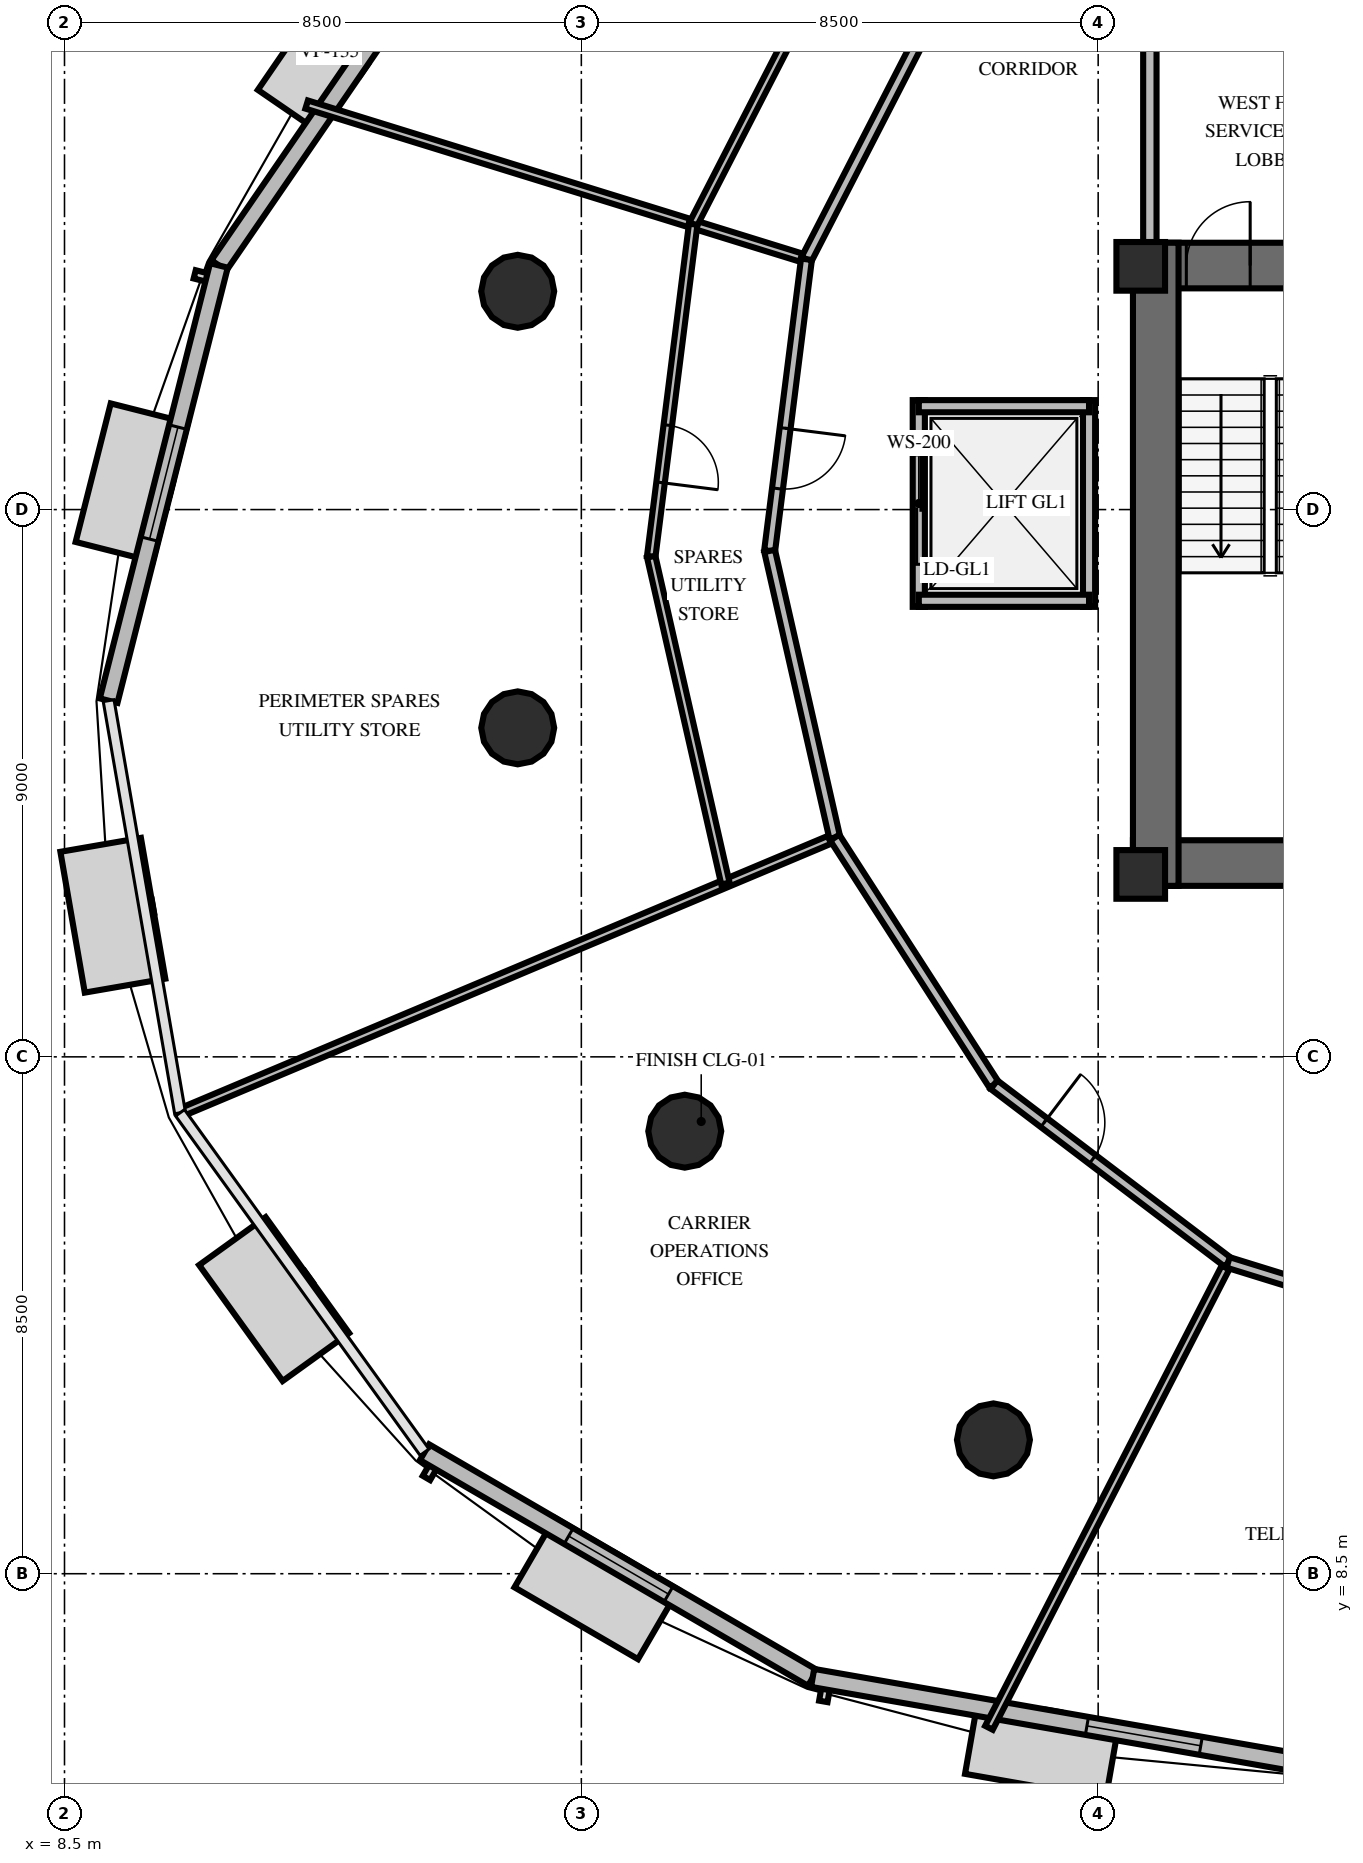
"""IFC4 building model, lengths in metres.
Left out: names, types, materials, properties, quantities, classifications, styles, units other than length and angle.
Written with IfcOpenShell. Run it as: python <this file> out.ifc"""

import sys

from ifc_helpers import new_model, si_unit, direction, frame, frame_2d, origin, origin_2d, place, context, subcontext, project, spatial, rectangle, circle, extrude, element, fill, save


model = new_model("IFC4")
c1 = context("Model", 3, precision=1e-05, world=origin(), true_north=direction((0.0, 1.0)))
c2 = subcontext(c1, "Body", "Model", "MODEL_VIEW")
j1 = project(units=[si_unit("LENGTHUNIT", "METRE"), si_unit("PLANEANGLEUNIT", "RADIAN")], contexts=[c1])
p1 = place(None, origin())
s1 = spatial("IfcSite", under=j1, at=p1, CompositionType="ELEMENT")
p2 = place(p1, origin())
s2 = spatial("IfcBuilding", under=s1, at=p2, CompositionType="ELEMENT")
p3 = place(p2, frame((0.0, 0.0, 129.8)))
s3 = spatial("IfcBuildingStorey", under=s2, at=p3, CompositionType="ELEMENT", Elevation=129.8)
p4 = place(p3, frame((26.072, 20.187, 0.0), z_axis=(0.0, 0.0, 1.0), x_axis=(1.0, 0.0, 0.0)))
e1 = element("IfcWall", 1, at=p4, inside=s3, PredefinedType="SHEAR", context=c2, shape_type="SweptSolid", body=[
    extrude(rectangle(XDim=15.866, YDim=0.75, at=frame_2d((7.933, 0.0))), origin(), (0.0, 0.0, 1.0), 4.0),
])
p5 = place(p3, frame((26.072, 30.013, 0.0), z_axis=(0.0, 0.0, 1.0), x_axis=(1.0, 0.0, 0.0)))
e2 = element("IfcWall", 2, at=p5, inside=s3, PredefinedType="SHEAR", context=c2, shape_type="SweptSolid", body=[
    extrude(rectangle(XDim=15.866, YDim=0.75, at=frame_2d((7.933, 0.0))), origin(), (0.0, 0.0, 1.0), 4.0),
])
p6 = place(p5, frame((0.878, 0.0, 0.0)))
e3 = element("IfcOpeningElement", 3, at=p6, cuts=e2, PredefinedType="OPENING", context=c2, shape_type="SweptSolid", body=[
    extrude(rectangle(XDim=1.05, YDim=2.15, at=frame_2d((0.525, 1.075))), frame((0.0, 0.385, 0.0), z_axis=(0.0, -1.0, 0.0), x_axis=(1.0, 0.0, 0.0)), (0.0, 0.0, 1.0), 0.77),
])
p7 = place(p5, frame((13.928, 0.0, 0.0)))
e4 = element("IfcOpeningElement", 4, at=p7, cuts=e2, PredefinedType="OPENING", context=c2, shape_type="SweptSolid", body=[
    extrude(rectangle(XDim=1.05, YDim=2.15, at=frame_2d((0.525, 1.075))), frame((0.0, 0.385, 0.0), z_axis=(0.0, -1.0, 0.0), x_axis=(1.0, 0.0, 0.0)), (0.0, 0.0, 1.0), 0.77),
])
p8 = place(p5, frame((7.378, 0.0, 0.0)))
e5 = element("IfcOpeningElement", 5, at=p8, cuts=e2, PredefinedType="OPENING", context=c2, shape_type="SweptSolid", body=[
    extrude(rectangle(XDim=1.1, YDim=2.15, at=frame_2d((0.55, 1.075))), frame((0.0, 0.385, 0.0), z_axis=(0.0, -1.0, 0.0), x_axis=(1.0, 0.0, 0.0)), (0.0, 0.0, 1.0), 0.77),
])
p9 = place(p3, frame((26.447, 19.812, 0.0), z_axis=(0.0, 0.0, 1.0), x_axis=(0.0, 1.0, 0.0)))
e6 = element("IfcWall", 6, at=p9, inside=s3, PredefinedType="SHEAR", context=c2, shape_type="SweptSolid", body=[
    extrude(rectangle(XDim=10.576, YDim=0.75, at=frame_2d((5.288, 0.0))), origin(), (0.0, 0.0, 1.0), 4.0),
])
for number, where, z_axis, x_axis in (
    (7, (26.2, 20.0, 0.0), (0.0, 0.0, 1.0), (1.0, 0.0, 0.0)),
    (8, (26.2, 30.0, 0.0), (0.0, 0.0, 1.0), (1.0, 0.0, 0.0)),
):
    element("IfcColumn", number, at=place(p3, frame(where, z_axis=z_axis, x_axis=x_axis)), inside=s3, PredefinedType="PILASTER", context=c2, shape_type="SweptSolid", body=[
        extrude(rectangle(XDim=0.8, YDim=0.8, at=origin_2d()), origin(), (0.0, 0.0, 1.0), 4.0),
    ])
for number, where, z_axis, x_axis in (
    (9, (15.954, 29.59, 0.0), (0.0, 0.0, 1.0), (1.0, 0.0, 0.0)),
    (10, (15.954, 22.41, 0.0), (0.0, 0.0, 1.0), (1.0, 0.0, 0.0)),
    (11, (18.701, 15.778, 0.0), (0.0, 0.0, 1.0), (1.0, 0.0, 0.0)),
    (12, (23.778, 10.701, 0.0), (0.0, 0.0, 1.0), (1.0, 0.0, 0.0)),
):
    element("IfcColumn", number, at=place(p3, frame(where, z_axis=z_axis, x_axis=x_axis)), inside=s3, PredefinedType="COLUMN", context=c2, shape_type="SweptSolid", body=[
        extrude(circle(Radius=0.6, at=origin_2d()), origin(), (0.0, 0.0, 1.0), 4.0),
    ])
p10 = place(p3, frame((15.622, 36.688, 0.0), z_axis=(0.0, 0.0, 1.0), x_axis=(-0.566158848857, -0.824296159072, 0.0)))
e13 = element("IfcWall", 13, at=p10, inside=s3, PredefinedType="SOLIDWALL", context=c2, shape_type="SweptSolid", body=[
    extrude(rectangle(XDim=8.095, YDim=0.3, at=frame_2d((4.047, 0.0))), origin(), (0.0, 0.0, 1.0), 2.9),
])
p11 = place(p10, frame((1.615, 0.0, 0.8)))
e14 = element("IfcOpeningElement", 14, at=p11, cuts=e13, PredefinedType="OPENING", context=c2, shape_type="SweptSolid", body=[
    extrude(rectangle(XDim=1.9, YDim=1.95, at=frame_2d((0.95, 0.975))), frame((0.0, 0.16, 0.0), z_axis=(0.0, -1.0, 0.0), x_axis=(1.0, 0.0, 0.0)), (0.0, 0.0, 1.0), 0.32),
])
p12 = place(p3, frame((11.039, 30.015, 0.0), z_axis=(0.0, 0.0, 1.0), x_axis=(-0.245615389449, -0.969367360945, 0.0)))
e15 = element("IfcWall", 15, at=p12, inside=s3, PredefinedType="SOLIDWALL", context=c2, shape_type="SweptSolid", body=[
    extrude(rectangle(XDim=7.383, YDim=0.3, at=frame_2d((3.692, 0.0))), origin(), (0.0, 0.0, 1.0), 2.9),
])
p13 = place(p12, frame((2.742, 0.0, 0.8)))
e16 = element("IfcOpeningElement", 16, at=p13, cuts=e15, PredefinedType="OPENING", context=c2, shape_type="SweptSolid", body=[
    extrude(rectangle(XDim=1.9, YDim=1.95, at=frame_2d((0.95, 0.975))), frame((0.0, 0.16, 0.0), z_axis=(0.0, -1.0, 0.0), x_axis=(1.0, 0.0, 0.0)), (0.0, 0.0, 1.0), 0.32),
])
p14 = place(p3, frame((14.421, 10.498, 0.0), z_axis=(0.0, 0.0, 1.0), x_axis=(0.864447367907, -0.502723331585, 0.0)))
e17 = element("IfcWall", 17, at=p14, inside=s3, PredefinedType="SOLIDWALL", context=c2, shape_type="SweptSolid", body=[
    extrude(rectangle(XDim=7.383, YDim=0.3, at=frame_2d((3.691, 0.0))), origin(), (0.0, 0.0, 1.0), 2.9),
])
p15 = place(p14, frame((2.742, 0.0, 0.8)))
e18 = element("IfcOpeningElement", 18, at=p15, cuts=e17, PredefinedType="OPENING", context=c2, shape_type="SweptSolid", body=[
    extrude(rectangle(XDim=1.9, YDim=1.95, at=frame_2d((0.95, 0.975))), frame((0.0, 0.16, 0.0), z_axis=(0.0, -1.0, 0.0), x_axis=(1.0, 0.0, 0.0)), (0.0, 0.0, 1.0), 0.32),
])
p16 = place(p3, frame((20.804, 6.786, 0.0), z_axis=(0.0, 0.0, 1.0), x_axis=(0.985055293806, -0.172238404964, 0.0)))
e19 = element("IfcWall", 19, at=p16, inside=s3, PredefinedType="SOLIDWALL", context=c2, shape_type="SweptSolid", body=[
    extrude(rectangle(XDim=8.095, YDim=0.3, at=frame_2d((4.048, 0.0))), origin(), (0.0, 0.0, 1.0), 2.9),
])
p17 = place(p16, frame((4.58, 0.0, 0.8)))
e20 = element("IfcOpeningElement", 20, at=p17, cuts=e19, PredefinedType="OPENING", context=c2, shape_type="SweptSolid", body=[
    extrude(rectangle(XDim=1.9, YDim=1.95, at=frame_2d((0.95, 0.975))), frame((0.0, 0.16, 0.0), z_axis=(0.0, -1.0, 0.0), x_axis=(1.0, 0.0, 0.0)), (0.0, 0.0, 1.0), 0.32),
])
p18 = place(p3, frame((26.35, 30.05, 0.0), z_axis=(0.0, 0.0, 1.0), x_axis=(0.0, 1.0, 0.0)))
e21 = element("IfcWall", 21, at=p18, inside=s3, PredefinedType="SOLIDWALL", context=c2, shape_type="SweptSolid", body=[
    extrude(rectangle(XDim=4.38, YDim=0.22, at=frame_2d((2.19, 0.0))), origin(), (0.0, 0.0, 1.0), 2.8),
])
p19 = place(p3, frame((22.55, 24.4, 0.0), z_axis=(0.0, 0.0, 1.0), x_axis=(0.0, 1.0, 0.0)))
e22 = element("IfcWall", 22, at=p19, inside=s3, PredefinedType="SOLIDWALL", context=c2, shape_type="SweptSolid", body=[
    extrude(rectangle(XDim=3.4, YDim=0.2, at=frame_2d((1.7, 0.0))), origin(), (0.0, 0.0, 1.0), 2.8),
])
p20 = place(p19, frame((0.7, 0.0, 0.0)))
e23 = element("IfcOpeningElement", 23, at=p20, cuts=e22, PredefinedType="OPENING", context=c2, shape_type="SweptSolid", body=[
    extrude(rectangle(XDim=1.8, YDim=2.4, at=frame_2d((0.9, 1.2))), frame((0.0, 0.11, 0.0), z_axis=(0.0, -1.0, 0.0), x_axis=(1.0, 0.0, 0.0)), (0.0, 0.0, 1.0), 0.22),
])
p21 = place(p3, frame((25.35, 24.4, 0.0), z_axis=(0.0, 0.0, 1.0), x_axis=(0.0, 1.0, 0.0)))
e24 = element("IfcWall", 24, at=p21, inside=s3, PredefinedType="SOLIDWALL", context=c2, shape_type="SweptSolid", body=[
    extrude(rectangle(XDim=3.4, YDim=0.2, at=frame_2d((1.7, 0.0))), origin(), (0.0, 0.0, 1.0), 2.8),
])
for number, where, z_axis, x_axis in (
    (25, (22.55, 24.5, 0.0), (0.0, 0.0, 1.0), (1.0, 0.0, 0.0)),
    (26, (22.55, 27.7, 0.0), (0.0, 0.0, 1.0), (1.0, 0.0, 0.0)),
):
    element("IfcWall", number, at=place(p3, frame(where, z_axis=z_axis, x_axis=x_axis)), inside=s3, PredefinedType="SOLIDWALL", context=c2, shape_type="SweptSolid", body=[
        extrude(rectangle(XDim=2.8, YDim=0.2, at=frame_2d((1.4, 0.0))), origin(), (0.0, 0.0, 1.0), 2.8),
    ])
p22 = place(p3, frame((20.702, 30.116, 0.0), z_axis=(0.0, 0.0, 1.0), x_axis=(-0.955272723626, 0.295726264467, 0.0)))
e27 = element("IfcWall", 27, at=p22, inside=s3, PredefinedType="PARTITIONING", context=c2, shape_type="SweptSolid", body=[
    extrude(rectangle(XDim=8.605, YDim=0.14, at=frame_2d((4.302, 0.0))), origin(), (0.0, 0.0, 1.0), 2.8),
])
p23 = place(p3, frame((22.912, 34.416, 0.0), z_axis=(0.0, 0.0, 1.0), x_axis=(-0.45712435145, -0.889402792503, 0.0)))
e28 = element("IfcWall", 28, at=p23, inside=s3, PredefinedType="PARTITIONING", context=c2, shape_type="SweptSolid", body=[
    extrude(rectangle(XDim=4.834, YDim=0.18, at=frame_2d((2.417, 0.0))), origin(), (0.0, 0.0, 1.0), 2.8),
])
p24 = place(p3, frame((21.359, 35.595, 0.0), z_axis=(0.0, 0.0, 1.0), x_axis=(-0.457125807765, -0.889402044002, 0.0)))
e29 = element("IfcWall", 29, at=p24, inside=s3, PredefinedType="PARTITIONING", context=c2, shape_type="SweptSolid", body=[
    extrude(rectangle(XDim=5.512, YDim=0.14, at=frame_2d((2.756, 0.0))), origin(), (0.0, 0.0, 1.0), 2.8),
])
p25 = place(p3, frame((21.168, 20.606, 0.0), z_axis=(0.0, 0.0, 1.0), x_axis=(-0.921864601023, -0.387512138366, 0.0)))
e30 = element("IfcWall", 30, at=p25, inside=s3, PredefinedType="PARTITIONING", context=c2, shape_type="SweptSolid", body=[
    extrude(rectangle(XDim=11.68, YDim=0.14, at=frame_2d((5.84, 0.0))), origin(), (0.0, 0.0, 1.0), 2.8),
])
p26 = place(p3, frame((20.702, 30.116, 0.0), z_axis=(0.0, 0.0, 1.0), x_axis=(-0.125296416972, -0.992119351638, 0.0)))
e31 = element("IfcWall", 31, at=p26, inside=s3, PredefinedType="PARTITIONING", context=c2, shape_type="SweptSolid", body=[
    extrude(rectangle(XDim=4.834, YDim=0.18, at=frame_2d((2.417, 0.0))), origin(), (0.0, 0.0, 1.0), 2.8),
])
p27 = place(p26, frame((2.801, 0.0, 0.0)))
e32 = element("IfcOpeningElement", 32, at=p27, cuts=e31, PredefinedType="OPENING", context=c2, shape_type="SweptSolid", body=[
    extrude(rectangle(XDim=1.0, YDim=2.15, at=frame_2d((0.5, 1.075))), frame((0.0, 0.1, 0.0), z_axis=(0.0, -1.0, 0.0), x_axis=(1.0, 0.0, 0.0)), (0.0, 0.0, 1.0), 0.2),
])
p28 = place(p3, frame((20.097, 25.32, 0.0), z_axis=(0.0, 0.0, 1.0), x_axis=(0.221542525612, -0.975150711093, 0.0)))
e33 = element("IfcWall", 33, at=p28, inside=s3, PredefinedType="PARTITIONING", context=c2, shape_type="SweptSolid", body=[
    extrude(rectangle(XDim=4.834, YDim=0.18, at=frame_2d((2.417, 0.0))), origin(), (0.0, 0.0, 1.0), 2.8),
])
p29 = place(p3, frame((18.84, 30.693, 0.0), z_axis=(0.0, 0.0, 1.0), x_axis=(-0.12531583285, -0.992116899381, 0.0)))
e34 = element("IfcWall", 34, at=p29, inside=s3, PredefinedType="PARTITIONING", context=c2, shape_type="SweptSolid", body=[
    extrude(rectangle(XDim=5.511, YDim=0.14, at=frame_2d((2.756, 0.0))), origin(), (0.0, 0.0, 1.0), 2.8),
])
p30 = place(p29, frame((3.331, 0.0, 0.0)))
e35 = element("IfcOpeningElement", 35, at=p30, cuts=e34, PredefinedType="OPENING", context=c2, shape_type="SweptSolid", body=[
    extrude(rectangle(XDim=0.95, YDim=2.15, at=frame_2d((0.475, 1.075))), frame((0.0, 0.08, 0.0), z_axis=(0.0, -1.0, 0.0), x_axis=(1.0, 0.0, 0.0)), (0.0, 0.0, 1.0), 0.16),
])
p31 = place(p3, frame((18.149, 25.225, 0.0), z_axis=(0.0, 0.0, 1.0), x_axis=(0.221561753592, -0.975146342528, 0.0)))
e36 = element("IfcWall", 36, at=p31, inside=s3, PredefinedType="PARTITIONING", context=c2, shape_type="SweptSolid", body=[
    extrude(rectangle(XDim=5.512, YDim=0.14, at=frame_2d((2.756, 0.0))), origin(), (0.0, 0.0, 1.0), 2.8),
])
p32 = place(p3, frame((27.637, 13.619, 0.0), z_axis=(0.0, 0.0, 1.0), x_axis=(-0.457105027407, -0.889412724172, 0.0)))
e37 = element("IfcWall", 37, at=p32, inside=s3, PredefinedType="PARTITIONING", context=c2, shape_type="SweptSolid", body=[
    extrude(rectangle(XDim=8.605, YDim=0.14, at=frame_2d((4.302, 0.0))), origin(), (0.0, 0.0, 1.0), 2.8),
])
p33 = place(p3, frame((21.168, 20.606, 0.0), z_axis=(0.0, 0.0, 1.0), x_axis=(0.541732258193, -0.840551105188, 0.0)))
e38 = element("IfcWall", 38, at=p33, inside=s3, PredefinedType="PARTITIONING", context=c2, shape_type="SweptSolid", body=[
    extrude(rectangle(XDim=4.834, YDim=0.18, at=frame_2d((2.417, 0.0))), origin(), (0.0, 0.0, 1.0), 2.8),
])
p34 = place(p3, frame((23.787, 16.542, 0.0), z_axis=(0.0, 0.0, 1.0), x_axis=(0.796520179577, -0.604611944579, 0.0)))
e39 = element("IfcWall", 39, at=p34, inside=s3, PredefinedType="PARTITIONING", context=c2, shape_type="SweptSolid", body=[
    extrude(rectangle(XDim=4.834, YDim=0.18, at=frame_2d((2.417, 0.0))), origin(), (0.0, 0.0, 1.0), 2.8),
])
p35 = place(p34, frame((1.034, 0.0, 0.0)))
e40 = element("IfcOpeningElement", 40, at=p35, cuts=e39, PredefinedType="OPENING", context=c2, shape_type="SweptSolid", body=[
    extrude(rectangle(XDim=1.0, YDim=2.15, at=frame_2d((0.5, 1.075))), frame((0.0, 0.1, 0.0), z_axis=(0.0, -1.0, 0.0), x_axis=(1.0, 0.0, 0.0)), (0.0, 0.0, 1.0), 0.2),
])
p36 = place(p3, frame((27.637, 13.619, 0.0), z_axis=(0.0, 0.0, 1.0), x_axis=(0.955270945658, -0.295732007706, 0.0)))
e41 = element("IfcWall", 41, at=p36, inside=s3, PredefinedType="PARTITIONING", context=c2, shape_type="SweptSolid", body=[
    extrude(rectangle(XDim=4.834, YDim=0.18, at=frame_2d((2.417, 0.0))), origin(), (0.0, 0.0, 1.0), 2.8),
])
p37 = place(p13, origin())
e42 = element("IfcWindow", 42, at=p37, inside=s3, PartitioningType="SINGLE_PANEL", PredefinedType="WINDOW", context=c2, shape_type="SweptSolid", body=[
    extrude(rectangle(XDim=1.9, YDim=1.95, at=frame_2d((0.95, 0.975))), frame((0.0, 0.03, 0.0), z_axis=(0.0, -1.0, 0.0), x_axis=(1.0, 0.0, 0.0)), (0.0, 0.0, 1.0), 0.06),
])
fill(e16, e42)
p38 = place(p15, origin())
e43 = element("IfcWindow", 43, at=p38, inside=s3, PartitioningType="SINGLE_PANEL", PredefinedType="WINDOW", context=c2, shape_type="SweptSolid", body=[
    extrude(rectangle(XDim=1.9, YDim=1.95, at=frame_2d((0.95, 0.975))), frame((0.0, 0.03, 0.0), z_axis=(0.0, -1.0, 0.0), x_axis=(1.0, 0.0, 0.0)), (0.0, 0.0, 1.0), 0.06),
])
fill(e18, e43)
p39 = place(p17, origin())
e44 = element("IfcWindow", 44, at=p39, inside=s3, PartitioningType="SINGLE_PANEL", PredefinedType="WINDOW", context=c2, shape_type="SweptSolid", body=[
    extrude(rectangle(XDim=1.9, YDim=1.95, at=frame_2d((0.95, 0.975))), frame((0.0, 0.03, 0.0), z_axis=(0.0, -1.0, 0.0), x_axis=(1.0, 0.0, 0.0)), (0.0, 0.0, 1.0), 0.06),
])
fill(e20, e44)
p40 = place(p6, origin())
e45 = element("IfcDoor", 45, at=p40, inside=s3, OperationType="SINGLE_SWING_RIGHT", PredefinedType="DOOR", context=c2, shape_type="SweptSolid", body=[
    extrude(rectangle(XDim=1.05, YDim=2.15, at=frame_2d((0.525, 1.075))), frame((0.0, 0.025, 0.0), z_axis=(0.0, -1.0, 0.0), x_axis=(1.0, 0.0, 0.0)), (0.0, 0.0, 1.0), 0.05),
])
fill(e3, e45)
p41 = place(p20, origin())
e46 = element("IfcDoor", 46, at=p41, inside=s3, OperationType="DOUBLE_DOOR_SLIDING", PredefinedType="USERDEFINED", context=c2, shape_type="SweptSolid", body=[
    extrude(rectangle(XDim=1.8, YDim=2.4, at=frame_2d((0.9, 1.2))), frame((0.0, 0.025, 0.0), z_axis=(0.0, -1.0, 0.0), x_axis=(1.0, 0.0, 0.0)), (0.0, 0.0, 1.0), 0.05),
])
fill(e23, e46)
p42 = place(p27, origin())
e47 = element("IfcDoor", 47, at=p42, inside=s3, OperationType="SINGLE_SWING_LEFT", PredefinedType="DOOR", context=c2, shape_type="SweptSolid", body=[
    extrude(rectangle(XDim=1.0, YDim=2.15, at=frame_2d((0.5, 1.075))), frame((0.0, 0.025, 0.0), z_axis=(0.0, -1.0, 0.0), x_axis=(1.0, 0.0, 0.0)), (0.0, 0.0, 1.0), 0.05),
])
fill(e32, e47)
p43 = place(p30, origin())
e48 = element("IfcDoor", 48, at=p43, inside=s3, OperationType="SINGLE_SWING_RIGHT", PredefinedType="DOOR", context=c2, shape_type="SweptSolid", body=[
    extrude(rectangle(XDim=0.95, YDim=2.15, at=frame_2d((0.475, 1.075))), frame((0.0, 0.025, 0.0), z_axis=(0.0, -1.0, 0.0), x_axis=(1.0, 0.0, 0.0)), (0.0, 0.0, 1.0), 0.05),
])
fill(e35, e48)
p44 = place(p35, origin())
e49 = element("IfcDoor", 49, at=p44, inside=s3, OperationType="SINGLE_SWING_LEFT", PredefinedType="DOOR", context=c2, shape_type="SweptSolid", body=[
    extrude(rectangle(XDim=1.0, YDim=2.15, at=frame_2d((0.5, 1.075))), frame((0.0, 0.025, 0.0), z_axis=(0.0, -1.0, 0.0), x_axis=(1.0, 0.0, 0.0)), (0.0, 0.0, 1.0), 0.05),
])
fill(e40, e49)
save(model, sys.argv[1])
